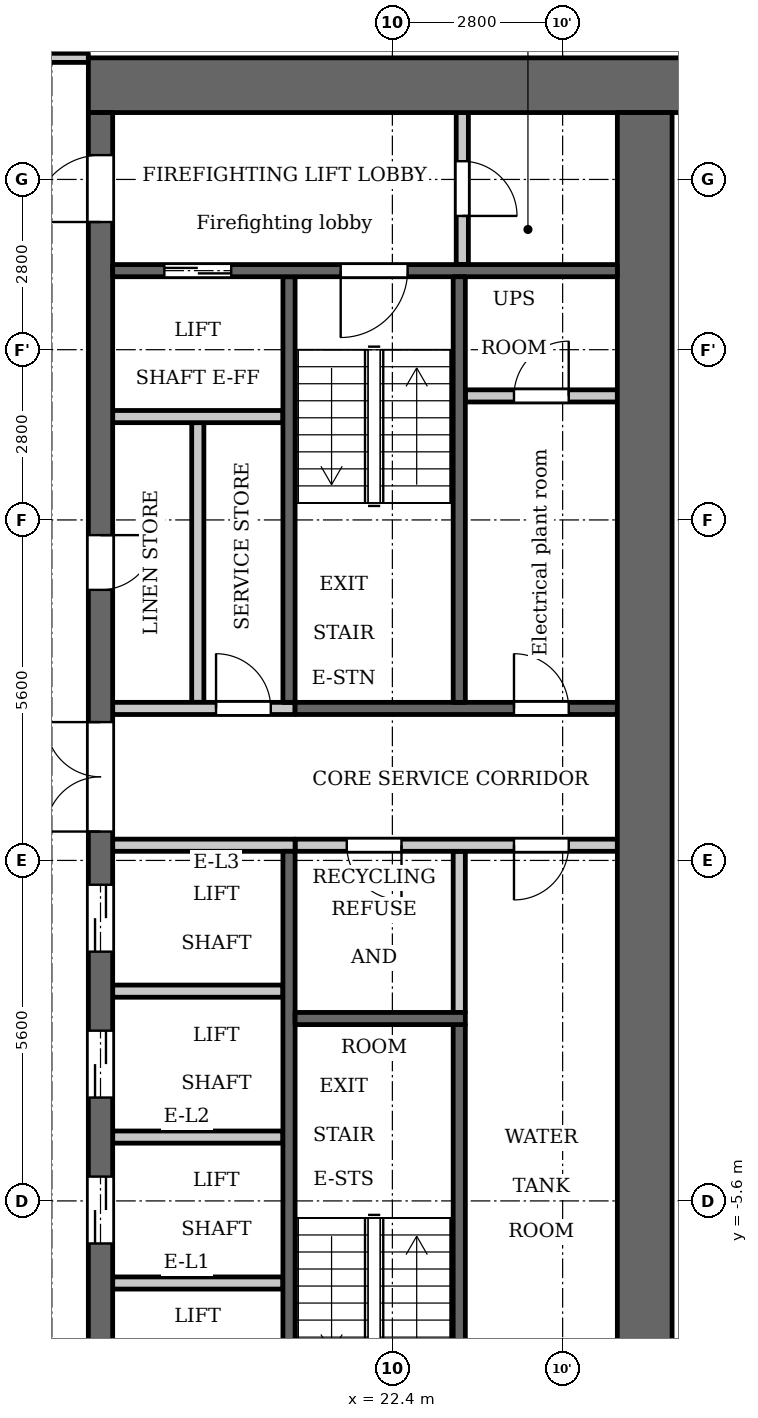
"""IFC4 building model, lengths in metres.
Left out: names, types, materials, properties, quantities, classifications, styles, units other than length and angle.
Written with IfcOpenShell. Run it as: python <this file> out.ifc"""

import sys

from ifc_helpers import new_model, si_unit, direction, frame, frame_2d, origin, place, context, subcontext, project, spatial, rectangle, extrude, element, fill, save


model = new_model("IFC4")
c1 = context("Model", 3, precision=1e-05, world=origin(), true_north=direction((0.0, 1.0)))
c2 = subcontext(c1, "Body", "Model", "MODEL_VIEW")
j1 = project(units=[si_unit("LENGTHUNIT", "METRE"), si_unit("PLANEANGLEUNIT", "RADIAN")], contexts=[c1])
p1 = place(None, origin())
s1 = spatial("IfcSite", under=j1, at=p1, CompositionType="ELEMENT")
p2 = place(p1, origin())
s2 = spatial("IfcBuilding", under=s1, at=p2, CompositionType="ELEMENT")
p3 = place(p2, frame((0.0, 0.0, 62.0)))
s3 = spatial("IfcBuildingStorey", under=s2, at=p3, CompositionType="ELEMENT", Elevation=62.0)
p4 = place(p3, frame((23.5, -2.5, 0.0), z_axis=(0.0, 0.0, 1.0), x_axis=(0.0, 1.0, 0.0)))
e1 = element("IfcWall", 1, at=p4, inside=s3, PredefinedType="PARTITIONING", context=c2, shape_type="SweptSolid", body=[
    extrude(rectangle(XDim=2.65, YDim=0.2, at=frame_2d((1.325, 0.0))), origin(), (0.0, 0.0, 1.0), 3.2),
])
p5 = place(p3, frame((20.7, 2.6, 0.0), z_axis=(0.0, 0.0, 1.0), x_axis=(0.0, 1.0, 0.0)))
e2 = element("IfcWall", 2, at=p5, inside=s3, PredefinedType="SHEAR", context=c2, shape_type="SweptSolid", body=[
    extrude(rectangle(XDim=7.0, YDim=0.2, at=frame_2d((3.5, 0.0))), origin(), (0.0, 0.0, 1.0), 3.2),
])
p6 = place(p3, frame((20.7, -9.6, 0.0), z_axis=(0.0, 0.0, 1.0), x_axis=(0.0, 1.0, 0.0)))
e3 = element("IfcWall", 3, at=p6, inside=s3, PredefinedType="SHEAR", context=c2, shape_type="SweptSolid", body=[
    extrude(rectangle(XDim=9.75, YDim=0.2, at=frame_2d((4.875, 0.0))), origin(), (0.0, 0.0, 1.0), 3.2),
])
p7 = place(p3, frame((20.8, 2.5, 0.0), z_axis=(0.0, 0.0, 1.0), x_axis=(1.0, 0.0, 0.0)))
e4 = element("IfcWall", 4, at=p7, inside=s3, PredefinedType="SHEAR", context=c2, shape_type="SweptSolid", body=[
    extrude(rectangle(XDim=5.3, YDim=0.2, at=frame_2d((2.65, 0.0))), origin(), (0.0, 0.0, 1.0), 3.2),
])
p8 = place(p7, frame((3.6, 0.0, 0.0)))
e5 = element("IfcOpeningElement", 5, at=p8, cuts=e4, PredefinedType="OPENING", context=c2, shape_type="SweptSolid", body=[
    extrude(rectangle(XDim=0.9, YDim=2.1, at=frame_2d((0.45, 1.05))), frame((0.0, 0.11, 0.0), z_axis=(0.0, -1.0, 0.0), x_axis=(1.0, 0.0, 0.0)), (0.0, 0.0, 1.0), 0.22),
])
p9 = place(p3, frame((20.8, 0.25, 0.0), z_axis=(0.0, 0.0, 1.0), x_axis=(1.0, 0.0, 0.0)))
e6 = element("IfcWall", 6, at=p9, inside=s3, PredefinedType="PARTITIONING", context=c2, shape_type="SweptSolid", body=[
    extrude(rectangle(XDim=5.3, YDim=0.2, at=frame_2d((2.65, 0.0))), origin(), (0.0, 0.0, 1.0), 3.2),
])
p10 = place(p9, frame((0.85, 0.0, 0.0)))
e7 = element("IfcOpeningElement", 7, at=p10, cuts=e6, PredefinedType="OPENING", context=c2, shape_type="SweptSolid", body=[
    extrude(rectangle(XDim=0.9, YDim=2.1, at=frame_2d((0.45, 1.05))), frame((0.0, 0.11, 0.0), z_axis=(0.0, -1.0, 0.0), x_axis=(1.0, 0.0, 0.0)), (0.0, 0.0, 1.0), 0.22),
])
p11 = place(p9, frame((3.6, 0.0, 0.0)))
e8 = element("IfcOpeningElement", 8, at=p11, cuts=e6, PredefinedType="OPENING", context=c2, shape_type="SweptSolid", body=[
    extrude(rectangle(XDim=0.9, YDim=2.1, at=frame_2d((0.45, 1.05))), frame((0.0, 0.11, 0.0), z_axis=(0.0, -1.0, 0.0), x_axis=(1.0, 0.0, 0.0)), (0.0, 0.0, 1.0), 0.22),
])
p12 = place(p3, frame((17.4, 12.75, 0.0), z_axis=(0.0, 0.0, 1.0), x_axis=(1.0, 0.0, 0.0)))
e9 = element("IfcWall", 9, at=p12, inside=s3, PredefinedType="SHEAR", context=c2, shape_type="SweptSolid", body=[
    extrude(rectangle(XDim=10.4, YDim=0.9, at=frame_2d((5.2, 0.0))), origin(), (0.0, 0.0, 1.0), 3.2),
])
p13 = place(p3, frame((19.2, 2.6, 0.0), z_axis=(0.0, 0.0, 1.0), x_axis=(0.0, 1.0, 0.0)))
e10 = element("IfcWall", 10, at=p13, inside=s3, PredefinedType="PARTITIONING", context=c2, shape_type="SweptSolid", body=[
    extrude(rectangle(XDim=4.6, YDim=0.2, at=frame_2d((2.3, 0.0))), origin(), (0.0, 0.0, 1.0), 3.2),
])
p14 = place(p3, frame((17.6, -12.3, 0.0), z_axis=(0.0, 0.0, 1.0), x_axis=(0.0, 1.0, 0.0)))
e11 = element("IfcWall", 11, at=p14, inside=s3, PredefinedType="SHEAR", context=c2, shape_type="SweptSolid", body=[
    extrude(rectangle(XDim=24.6, YDim=0.4, at=frame_2d((12.3, 0.0))), origin(), (0.0, 0.0, 1.0), 3.2),
])
p15 = place(p14, frame((6.0, 0.0, 0.0)))
e12 = element("IfcOpeningElement", 12, at=p15, cuts=e11, PredefinedType="OPENING", context=c2, shape_type="SweptSolid", body=[
    extrude(rectangle(XDim=1.1, YDim=2.1, at=frame_2d((0.55, 1.05))), frame((0.0, 0.21, 0.0), z_axis=(0.0, -1.0, 0.0), x_axis=(1.0, 0.0, 0.0)), (0.0, 0.0, 1.0), 0.42),
])
p16 = place(p14, frame((8.4, 0.0, 0.0)))
e13 = element("IfcOpeningElement", 13, at=p16, cuts=e11, PredefinedType="OPENING", context=c2, shape_type="SweptSolid", body=[
    extrude(rectangle(XDim=1.1, YDim=2.1, at=frame_2d((0.55, 1.05))), frame((0.0, 0.21, 0.0), z_axis=(0.0, -1.0, 0.0), x_axis=(1.0, 0.0, 0.0)), (0.0, 0.0, 1.0), 0.42),
])
p17 = place(p14, frame((10.8, 0.0, 0.0)))
e14 = element("IfcOpeningElement", 14, at=p17, cuts=e11, PredefinedType="OPENING", context=c2, shape_type="SweptSolid", body=[
    extrude(rectangle(XDim=1.1, YDim=2.1, at=frame_2d((0.55, 1.05))), frame((0.0, 0.21, 0.0), z_axis=(0.0, -1.0, 0.0), x_axis=(1.0, 0.0, 0.0)), (0.0, 0.0, 1.0), 0.42),
])
p18 = place(p14, frame((16.75, 0.0, 0.0)))
e15 = element("IfcOpeningElement", 15, at=p18, cuts=e11, PredefinedType="OPENING", context=c2, shape_type="SweptSolid", body=[
    extrude(rectangle(XDim=0.9, YDim=2.1, at=frame_2d((0.45, 1.05))), frame((0.0, 0.21, 0.0), z_axis=(0.0, -1.0, 0.0), x_axis=(1.0, 0.0, 0.0)), (0.0, 0.0, 1.0), 0.42),
])
p19 = place(p14, frame((22.8, 0.0, 0.0)))
e16 = element("IfcOpeningElement", 16, at=p19, cuts=e11, PredefinedType="OPENING", context=c2, shape_type="SweptSolid", body=[
    extrude(rectangle(XDim=1.1, YDim=2.1, at=frame_2d((0.55, 1.05))), frame((0.0, 0.21, 0.0), z_axis=(0.0, -1.0, 0.0), x_axis=(1.0, 0.0, 0.0)), (0.0, 0.0, 1.0), 0.42),
])
p20 = place(p14, frame((0.7, 0.0, 0.0)))
e17 = element("IfcOpeningElement", 17, at=p20, cuts=e11, PredefinedType="OPENING", context=c2, shape_type="SweptSolid", body=[
    extrude(rectangle(XDim=1.1, YDim=2.1, at=frame_2d((0.55, 1.05))), frame((0.0, 0.21, 0.0), z_axis=(0.0, -1.0, 0.0), x_axis=(1.0, 0.0, 0.0)), (0.0, 0.0, 1.0), 0.42),
])
p21 = place(p14, frame((12.775, 0.0, 0.0)))
e18 = element("IfcOpeningElement", 18, at=p21, cuts=e11, PredefinedType="OPENING", context=c2, shape_type="SweptSolid", body=[
    extrude(rectangle(XDim=1.8, YDim=2.1, at=frame_2d((0.9, 1.05))), frame((0.0, 0.21, 0.0), z_axis=(0.0, -1.0, 0.0), x_axis=(1.0, 0.0, 0.0)), (0.0, 0.0, 1.0), 0.42),
])
p22 = place(p3, frame((26.55, -12.3, 0.0), z_axis=(0.0, 0.0, 1.0), x_axis=(0.0, 1.0, 0.0)))
e19 = element("IfcWall", 19, at=p22, inside=s3, PredefinedType="SHEAR", context=c2, shape_type="SweptSolid", body=[
    extrude(rectangle(XDim=24.6, YDim=0.9, at=frame_2d((12.3, 0.0))), origin(), (0.0, 0.0, 1.0), 3.2),
])
p23 = place(p3, frame((23.55, 9.8, 0.0), z_axis=(0.0, 0.0, 1.0), x_axis=(0.0, 1.0, 0.0)))
e20 = element("IfcWall", 20, at=p23, inside=s3, PredefinedType="PARTITIONING", context=c2, shape_type="SweptSolid", body=[
    extrude(rectangle(XDim=2.5, YDim=0.2, at=frame_2d((1.25, 0.0))), origin(), (0.0, 0.0, 1.0), 3.2),
])
p24 = place(p23, frame((0.8, 0.0, 0.0)))
e21 = element("IfcOpeningElement", 21, at=p24, cuts=e20, PredefinedType="OPENING", context=c2, shape_type="SweptSolid", body=[
    extrude(rectangle(XDim=0.9, YDim=2.1, at=frame_2d((0.45, 1.05))), frame((0.0, 0.11, 0.0), z_axis=(0.0, -1.0, 0.0), x_axis=(1.0, 0.0, 0.0)), (0.0, 0.0, 1.0), 0.22),
])
p25 = place(p3, frame((23.6, 7.64, 0.0), z_axis=(0.0, 0.0, 1.0), x_axis=(1.0, 0.0, 0.0)))
e22 = element("IfcWall", 22, at=p25, inside=s3, PredefinedType="PARTITIONING", context=c2, shape_type="SweptSolid", body=[
    extrude(rectangle(XDim=2.5, YDim=0.2, at=frame_2d((1.25, 0.0))), origin(), (0.0, 0.0, 1.0), 3.2),
])
p26 = place(p25, frame((0.8, 0.0, 0.0)))
e23 = element("IfcOpeningElement", 23, at=p26, cuts=e22, PredefinedType="OPENING", context=c2, shape_type="SweptSolid", body=[
    extrude(rectangle(XDim=0.9, YDim=2.1, at=frame_2d((0.45, 1.05))), frame((0.0, 0.11, 0.0), z_axis=(0.0, -1.0, 0.0), x_axis=(1.0, 0.0, 0.0)), (0.0, 0.0, 1.0), 0.22),
])
for number, where, z_axis, x_axis in (
    (24, (17.8, -6.95, 0.0), (0.0, 0.0, 1.0), (1.0, 0.0, 0.0)),
    (25, (17.8, -4.55, 0.0), (0.0, 0.0, 1.0), (1.0, 0.0, 0.0)),
    (26, (17.8, -2.15, 0.0), (0.0, 0.0, 1.0), (1.0, 0.0, 0.0)),
):
    element("IfcWall", number, at=place(p3, frame(where, z_axis=z_axis, x_axis=x_axis)), inside=s3, PredefinedType="PARTITIONING", context=c2, shape_type="SweptSolid", body=[
        extrude(rectangle(XDim=2.8, YDim=0.2, at=frame_2d((1.4, 0.0))), origin(), (0.0, 0.0, 1.0), 3.2),
    ])
p27 = place(p3, frame((17.8, 0.25, 0.0), z_axis=(0.0, 0.0, 1.0), x_axis=(1.0, 0.0, 0.0)))
e27 = element("IfcWall", 27, at=p27, inside=s3, PredefinedType="PARTITIONING", context=c2, shape_type="SweptSolid", body=[
    extrude(rectangle(XDim=3.0, YDim=0.2, at=frame_2d((1.5, 0.0))), origin(), (0.0, 0.0, 1.0), 3.2),
])
p28 = place(p3, frame((17.8, 2.5, 0.0), z_axis=(0.0, 0.0, 1.0), x_axis=(1.0, 0.0, 0.0)))
e28 = element("IfcWall", 28, at=p28, inside=s3, PredefinedType="PARTITIONING", context=c2, shape_type="SweptSolid", body=[
    extrude(rectangle(XDim=3.0, YDim=0.2, at=frame_2d((1.5, 0.0))), origin(), (0.0, 0.0, 1.0), 3.2),
])
p29 = place(p28, frame((1.7, 0.0, 0.0)))
e29 = element("IfcOpeningElement", 29, at=p29, cuts=e28, PredefinedType="OPENING", context=c2, shape_type="SweptSolid", body=[
    extrude(rectangle(XDim=0.9, YDim=2.1, at=frame_2d((0.45, 1.05))), frame((0.0, 0.11, 0.0), z_axis=(0.0, -1.0, 0.0), x_axis=(1.0, 0.0, 0.0)), (0.0, 0.0, 1.0), 0.22),
])
p30 = place(p3, frame((17.8, 7.3, 0.0), z_axis=(0.0, 0.0, 1.0), x_axis=(1.0, 0.0, 0.0)))
e30 = element("IfcWall", 30, at=p30, inside=s3, PredefinedType="PARTITIONING", context=c2, shape_type="SweptSolid", body=[
    extrude(rectangle(XDim=2.8, YDim=0.2, at=frame_2d((1.4, 0.0))), origin(), (0.0, 0.0, 1.0), 3.2),
])
p31 = place(p3, frame((17.8, 9.7, 0.0), z_axis=(0.0, 0.0, 1.0), x_axis=(1.0, 0.0, 0.0)))
e31 = element("IfcWall", 31, at=p31, inside=s3, PredefinedType="SHEAR", context=c2, shape_type="SweptSolid", body=[
    extrude(rectangle(XDim=8.3, YDim=0.2, at=frame_2d((4.15, 0.0))), origin(), (0.0, 0.0, 1.0), 3.2),
])
p32 = place(p31, frame((0.85, 0.0, 0.0)))
e32 = element("IfcOpeningElement", 32, at=p32, cuts=e31, PredefinedType="OPENING", context=c2, shape_type="SweptSolid", body=[
    extrude(rectangle(XDim=1.1, YDim=2.1, at=frame_2d((0.55, 1.05))), frame((0.0, 0.11, 0.0), z_axis=(0.0, -1.0, 0.0), x_axis=(1.0, 0.0, 0.0)), (0.0, 0.0, 1.0), 0.22),
])
p33 = place(p31, frame((3.75, 0.0, 0.0)))
e33 = element("IfcOpeningElement", 33, at=p33, cuts=e31, PredefinedType="OPENING", context=c2, shape_type="SweptSolid", body=[
    extrude(rectangle(XDim=1.1, YDim=2.1, at=frame_2d((0.55, 1.05))), frame((0.0, 0.11, 0.0), z_axis=(0.0, -1.0, 0.0), x_axis=(1.0, 0.0, 0.0)), (0.0, 0.0, 1.0), 0.22),
])
p34 = place(p3, frame((23.5, 2.6, 0.0), z_axis=(0.0, 0.0, 1.0), x_axis=(0.0, 1.0, 0.0)))
e34 = element("IfcWall", 34, at=p34, inside=s3, PredefinedType="SHEAR", context=c2, shape_type="SweptSolid", body=[
    extrude(rectangle(XDim=7.0, YDim=0.2, at=frame_2d((3.5, 0.0))), origin(), (0.0, 0.0, 1.0), 3.2),
])
p35 = place(p3, frame((23.5, -9.6, 0.0), z_axis=(0.0, 0.0, 1.0), x_axis=(0.0, 1.0, 0.0)))
e35 = element("IfcWall", 35, at=p35, inside=s3, PredefinedType="SHEAR", context=c2, shape_type="SweptSolid", body=[
    extrude(rectangle(XDim=6.9, YDim=0.2, at=frame_2d((3.45, 0.0))), origin(), (0.0, 0.0, 1.0), 3.2),
])
p36 = place(p3, frame((20.8, -2.6, 0.0), z_axis=(0.0, 0.0, 1.0), x_axis=(1.0, 0.0, 0.0)))
e36 = element("IfcWall", 36, at=p36, inside=s3, PredefinedType="SHEAR", context=c2, shape_type="SweptSolid", body=[
    extrude(rectangle(XDim=2.8, YDim=0.2, at=frame_2d((1.4, 0.0))), origin(), (0.0, 0.0, 1.0), 3.2),
])
p37 = place(p3, frame((-17.4, 13.2, 0.0), z_axis=(0.0, 0.0, 1.0), x_axis=(1.0, 0.0, 0.0)))
e37 = element("IfcWall", 37, at=p37, inside=s3, PredefinedType="PARTITIONING", context=c2, shape_type="SweptSolid", body=[
    extrude(rectangle(XDim=34.8, YDim=0.15, at=frame_2d((17.4, 0.0))), origin(), (0.0, 0.0, 1.0), 3.2),
])
p38 = place(p37, frame((0.75, 0.0, 0.0)))
e38 = element("IfcOpeningElement", 38, at=p38, cuts=e37, PredefinedType="OPENING", context=c2, shape_type="SweptSolid", body=[
    extrude(rectangle(XDim=1.0, YDim=2.1, at=frame_2d((0.5, 1.05))), frame((0.0, 0.085, 0.0), z_axis=(0.0, -1.0, 0.0), x_axis=(1.0, 0.0, 0.0)), (0.0, 0.0, 1.0), 0.17),
])
p39 = place(p37, frame((33.15, 0.0, 0.0)))
e39 = element("IfcOpeningElement", 39, at=p39, cuts=e37, PredefinedType="OPENING", context=c2, shape_type="SweptSolid", body=[
    extrude(rectangle(XDim=1.0, YDim=2.1, at=frame_2d((0.5, 1.05))), frame((0.0, 0.085, 0.0), z_axis=(0.0, -1.0, 0.0), x_axis=(1.0, 0.0, 0.0)), (0.0, 0.0, 1.0), 0.17),
])
p40 = place(p37, frame((6.85, 0.0, 0.0)))
e40 = element("IfcOpeningElement", 40, at=p40, cuts=e37, PredefinedType="OPENING", context=c2, shape_type="SweptSolid", body=[
    extrude(rectangle(XDim=1.0, YDim=2.1, at=frame_2d((0.5, 1.05))), frame((0.0, 0.085, 0.0), z_axis=(0.0, -1.0, 0.0), x_axis=(1.0, 0.0, 0.0)), (0.0, 0.0, 1.0), 0.17),
])
p41 = place(p37, frame((12.45, 0.0, 0.0)))
e41 = element("IfcOpeningElement", 41, at=p41, cuts=e37, PredefinedType="OPENING", context=c2, shape_type="SweptSolid", body=[
    extrude(rectangle(XDim=1.0, YDim=2.1, at=frame_2d((0.5, 1.05))), frame((0.0, 0.085, 0.0), z_axis=(0.0, -1.0, 0.0), x_axis=(1.0, 0.0, 0.0)), (0.0, 0.0, 1.0), 0.17),
])
p42 = place(p37, frame((23.65, 0.0, 0.0)))
e42 = element("IfcOpeningElement", 42, at=p42, cuts=e37, PredefinedType="OPENING", context=c2, shape_type="SweptSolid", body=[
    extrude(rectangle(XDim=1.0, YDim=2.1, at=frame_2d((0.5, 1.05))), frame((0.0, 0.085, 0.0), z_axis=(0.0, -1.0, 0.0), x_axis=(1.0, 0.0, 0.0)), (0.0, 0.0, 1.0), 0.17),
])
p43 = place(p15, origin())
e43 = element("IfcDoor", 43, at=p43, inside=s3, OperationType="DOUBLE_DOOR_SLIDING", PredefinedType="DOOR", context=c2, shape_type="SweptSolid", body=[
    extrude(rectangle(XDim=1.1, YDim=2.1, at=frame_2d((0.55, 1.05))), frame((0.0, 0.025, 0.0), z_axis=(0.0, -1.0, 0.0), x_axis=(1.0, 0.0, 0.0)), (0.0, 0.0, 1.0), 0.05),
])
fill(e12, e43)
p44 = place(p16, origin())
e44 = element("IfcDoor", 44, at=p44, inside=s3, OperationType="DOUBLE_DOOR_SLIDING", PredefinedType="DOOR", context=c2, shape_type="SweptSolid", body=[
    extrude(rectangle(XDim=1.1, YDim=2.1, at=frame_2d((0.55, 1.05))), frame((0.0, 0.025, 0.0), z_axis=(0.0, -1.0, 0.0), x_axis=(1.0, 0.0, 0.0)), (0.0, 0.0, 1.0), 0.05),
])
fill(e13, e44)
p45 = place(p17, origin())
e45 = element("IfcDoor", 45, at=p45, inside=s3, OperationType="DOUBLE_DOOR_SLIDING", PredefinedType="DOOR", context=c2, shape_type="SweptSolid", body=[
    extrude(rectangle(XDim=1.1, YDim=2.1, at=frame_2d((0.55, 1.05))), frame((0.0, 0.025, 0.0), z_axis=(0.0, -1.0, 0.0), x_axis=(1.0, 0.0, 0.0)), (0.0, 0.0, 1.0), 0.05),
])
fill(e14, e45)
p46 = place(p18, origin())
e46 = element("IfcDoor", 46, at=p46, inside=s3, OperationType="SINGLE_SWING_RIGHT", PredefinedType="DOOR", context=c2, shape_type="SweptSolid", body=[
    extrude(rectangle(XDim=0.9, YDim=2.1, at=frame_2d((0.45, 1.05))), frame((0.0, 0.025, 0.0), z_axis=(0.0, -1.0, 0.0), x_axis=(1.0, 0.0, 0.0)), (0.0, 0.0, 1.0), 0.05),
])
fill(e15, e46)
p47 = place(p29, origin())
e47 = element("IfcDoor", 47, at=p47, inside=s3, OperationType="SINGLE_SWING_RIGHT", PredefinedType="DOOR", context=c2, shape_type="SweptSolid", body=[
    extrude(rectangle(XDim=0.9, YDim=2.1, at=frame_2d((0.45, 1.05))), frame((0.0, 0.025, 0.0), z_axis=(0.0, -1.0, 0.0), x_axis=(1.0, 0.0, 0.0)), (0.0, 0.0, 1.0), 0.05),
])
fill(e29, e47)
p48 = place(p32, origin())
e48 = element("IfcDoor", 48, at=p48, inside=s3, OperationType="DOUBLE_DOOR_SLIDING", PredefinedType="DOOR", context=c2, shape_type="SweptSolid", body=[
    extrude(rectangle(XDim=1.1, YDim=2.1, at=frame_2d((0.55, 1.05))), frame((0.0, 0.025, 0.0), z_axis=(0.0, -1.0, 0.0), x_axis=(1.0, 0.0, 0.0)), (0.0, 0.0, 1.0), 0.05),
])
fill(e32, e48)
p49 = place(p19, origin())
e49 = element("IfcDoor", 49, at=p49, inside=s3, OperationType="SINGLE_SWING_RIGHT", PredefinedType="DOOR", context=c2, shape_type="SweptSolid", body=[
    extrude(rectangle(XDim=1.1, YDim=2.1, at=frame_2d((0.55, 1.05))), frame((0.0, 0.025, 0.0), z_axis=(0.0, -1.0, 0.0), x_axis=(1.0, 0.0, 0.0)), (0.0, 0.0, 1.0), 0.05),
])
fill(e16, e49)
p50 = place(p24, origin())
e50 = element("IfcDoor", 50, at=p50, inside=s3, OperationType="SINGLE_SWING_LEFT", PredefinedType="DOOR", context=c2, shape_type="SweptSolid", body=[
    extrude(rectangle(XDim=0.9, YDim=2.1, at=frame_2d((0.45, 1.05))), frame((0.0, 0.025, 0.0), z_axis=(0.0, -1.0, 0.0), x_axis=(1.0, 0.0, 0.0)), (0.0, 0.0, 1.0), 0.05),
])
fill(e21, e50)
p51 = place(p33, origin())
e51 = element("IfcDoor", 51, at=p51, inside=s3, OperationType="SINGLE_SWING_LEFT", PredefinedType="DOOR", context=c2, shape_type="SweptSolid", body=[
    extrude(rectangle(XDim=1.1, YDim=2.1, at=frame_2d((0.55, 1.05))), frame((0.0, 0.025, 0.0), z_axis=(0.0, -1.0, 0.0), x_axis=(1.0, 0.0, 0.0)), (0.0, 0.0, 1.0), 0.05),
])
fill(e33, e51)
p52 = place(p21, origin())
e52 = element("IfcDoor", 52, at=p52, inside=s3, OperationType="DOUBLE_DOOR_SINGLE_SWING", PredefinedType="DOOR", context=c2, shape_type="SweptSolid", body=[
    extrude(rectangle(XDim=1.8, YDim=2.1, at=frame_2d((0.9, 1.05))), frame((0.0, 0.025, 0.0), z_axis=(0.0, -1.0, 0.0), x_axis=(1.0, 0.0, 0.0)), (0.0, 0.0, 1.0), 0.05),
])
fill(e18, e52)
p53 = place(p10, origin())
e53 = element("IfcDoor", 53, at=p53, inside=s3, OperationType="SINGLE_SWING_RIGHT", PredefinedType="DOOR", context=c2, shape_type="SweptSolid", body=[
    extrude(rectangle(XDim=0.9, YDim=2.1, at=frame_2d((0.45, 1.05))), frame((0.0, 0.025, 0.0), z_axis=(0.0, -1.0, 0.0), x_axis=(1.0, 0.0, 0.0)), (0.0, 0.0, 1.0), 0.05),
])
fill(e7, e53)
p54 = place(p11, origin())
e54 = element("IfcDoor", 54, at=p54, inside=s3, OperationType="SINGLE_SWING_LEFT", PredefinedType="DOOR", context=c2, shape_type="SweptSolid", body=[
    extrude(rectangle(XDim=0.9, YDim=2.1, at=frame_2d((0.45, 1.05))), frame((0.0, 0.025, 0.0), z_axis=(0.0, -1.0, 0.0), x_axis=(1.0, 0.0, 0.0)), (0.0, 0.0, 1.0), 0.05),
])
fill(e8, e54)
p55 = place(p26, origin())
e55 = element("IfcDoor", 55, at=p55, inside=s3, OperationType="SINGLE_SWING_LEFT", PredefinedType="DOOR", context=c2, shape_type="SweptSolid", body=[
    extrude(rectangle(XDim=0.9, YDim=2.1, at=frame_2d((0.45, 1.05))), frame((0.0, 0.025, 0.0), z_axis=(0.0, -1.0, 0.0), x_axis=(1.0, 0.0, 0.0)), (0.0, 0.0, 1.0), 0.05),
])
fill(e23, e55)
p56 = place(p8, origin())
e56 = element("IfcDoor", 56, at=p56, inside=s3, OperationType="SINGLE_SWING_RIGHT", PredefinedType="DOOR", context=c2, shape_type="SweptSolid", body=[
    extrude(rectangle(XDim=0.9, YDim=2.1, at=frame_2d((0.45, 1.05))), frame((0.0, 0.025, 0.0), z_axis=(0.0, -1.0, 0.0), x_axis=(1.0, 0.0, 0.0)), (0.0, 0.0, 1.0), 0.05),
])
fill(e5, e56)
save(model, sys.argv[1])
